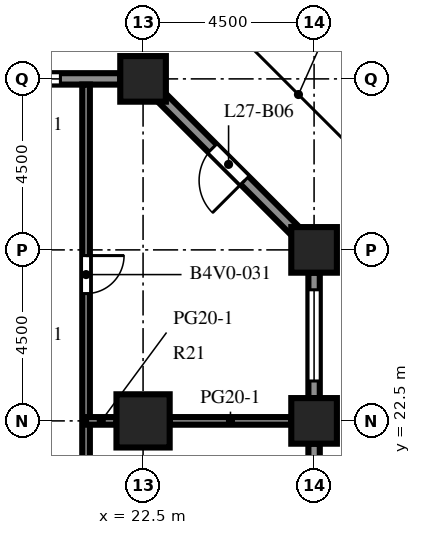
"""IFC4 building model, lengths in metres.
Left out: names, types, materials, properties, quantities, classifications, styles, units other than length and angle.
Written with IfcOpenShell. Run it as: python <this file> out.ifc"""

import sys

from ifc_helpers import new_model, si_unit, direction, frame, frame_2d, origin, origin_2d, place, context, subcontext, project, spatial, rectangle, extrude, element, fill, save


model = new_model("IFC4")
c1 = context("Model", 3, precision=1e-05, world=origin(), true_north=direction((0.0, 1.0)))
c2 = subcontext(c1, "Body", "Model", "MODEL_VIEW")
j1 = project(units=[si_unit("LENGTHUNIT", "METRE"), si_unit("PLANEANGLEUNIT", "RADIAN")], contexts=[c1])
p1 = place(None, origin())
s1 = spatial("IfcSite", under=j1, at=p1, CompositionType="ELEMENT")
p2 = place(p1, origin())
s2 = spatial("IfcBuilding", under=s1, at=p2, CompositionType="ELEMENT")
p3 = place(p2, frame((0.0, 0.0, 120.8)))
s3 = spatial("IfcBuildingStorey", under=s2, at=p3, CompositionType="ELEMENT", Elevation=120.8)
for number, where, z_axis, x_axis in (
    (1, (22.5, 31.5, 0.0), (0.0, 0.0, 1.0), (1.0, 0.0, 0.0)),
    (2, (27.0, 22.5, 0.0), (0.0, 0.0, 1.0), (1.0, 0.0, 0.0)),
    (3, (27.0, 27.0, 0.0), (0.0, 0.0, 1.0), (1.0, 0.0, 0.0)),
):
    element("IfcColumn", number, at=place(p3, frame(where, z_axis=z_axis, x_axis=x_axis)), inside=s3, PredefinedType="COLUMN", context=c2, shape_type="SweptSolid", body=[
        extrude(rectangle(XDim=1.2, YDim=1.2, at=origin_2d()), origin(), (0.0, 0.0, 1.0), 4.1),
    ])
p4 = place(p3, frame((22.5, 22.5, 0.0), z_axis=(0.0, 0.0, 1.0), x_axis=(1.0, 0.0, 0.0)))
e4 = element("IfcColumn", 4, at=p4, inside=s3, PredefinedType="COLUMN", context=c2, shape_type="SweptSolid", body=[
    extrude(rectangle(XDim=1.4, YDim=1.4, at=origin_2d()), origin(), (0.0, 0.0, 1.0), 4.1),
])
p5 = place(p3, frame((27.0, 21.9, 0.0), z_axis=(0.0, 0.0, 1.0), x_axis=(0.0, -1.0, 0.0)))
e5 = element("IfcWall", 5, at=p5, inside=s3, PredefinedType="SOLIDWALL", context=c2, shape_type="SweptSolid", body=[
    extrude(rectangle(XDim=3.3, YDim=0.3, at=frame_2d((1.65, 0.0))), origin(), (0.0, 0.0, 1.0), 2.75),
])
p6 = place(p5, frame((1.15, 0.0, 0.0)))
e6 = element("IfcOpeningElement", 6, at=p6, cuts=e5, PredefinedType="OPENING", context=c2, shape_type="SweptSolid", body=[
    extrude(rectangle(XDim=1.0, YDim=2.2, at=frame_2d((0.5, 1.1))), frame((0.0, 0.16, 0.0), z_axis=(0.0, -1.0, 0.0), x_axis=(1.0, 0.0, 0.0)), (0.0, 0.0, 1.0), 0.32),
])
p7 = place(p3, frame((27.0, 26.4, 0.0), z_axis=(0.0, 0.0, 1.0), x_axis=(0.0, -1.0, 0.0)))
e7 = element("IfcWall", 7, at=p7, inside=s3, PredefinedType="SOLIDWALL", context=c2, shape_type="SweptSolid", body=[
    extrude(rectangle(XDim=3.3, YDim=0.3, at=frame_2d((1.65, 0.0))), origin(), (0.0, 0.0, 1.0), 2.75),
])
p8 = place(p7, frame((0.45, 0.0, 0.8)))
e8 = element("IfcOpeningElement", 8, at=p8, cuts=e7, PredefinedType="OPENING", context=c2, shape_type="SweptSolid", body=[
    extrude(rectangle(XDim=2.4, YDim=1.7, at=frame_2d((1.2, 0.85))), frame((0.0, 0.16, 0.0), z_axis=(0.0, -1.0, 0.0), x_axis=(1.0, 0.0, 0.0)), (0.0, 0.0, 1.0), 0.32),
])
p9 = place(p3, frame((22.994, 31.006, 0.0), z_axis=(0.0, 0.0, 1.0), x_axis=(0.707106781187, -0.707106781187, 0.0)))
e9 = element("IfcWall", 9, at=p9, inside=s3, PredefinedType="SOLIDWALL", context=c2, shape_type="SweptSolid", body=[
    extrude(rectangle(XDim=4.967, YDim=0.3, at=frame_2d((2.483, 0.0))), origin(), (0.0, 0.0, 1.0), 2.75),
])
p10 = place(p9, frame((1.884, 0.0, 0.0)))
e10 = element("IfcOpeningElement", 10, at=p10, cuts=e9, PredefinedType="OPENING", context=c2, shape_type="SweptSolid", body=[
    extrude(rectangle(XDim=1.2, YDim=2.2, at=frame_2d((0.6, 1.1))), frame((0.0, 0.16, 0.0), z_axis=(0.0, -1.0, 0.0), x_axis=(1.0, 0.0, 0.0)), (0.0, 0.0, 1.0), 0.32),
])
p11 = place(p3, frame((18.6, 31.5, 0.0), z_axis=(0.0, 0.0, 1.0), x_axis=(1.0, 0.0, 0.0)))
e11 = element("IfcWall", 11, at=p11, inside=s3, PredefinedType="SOLIDWALL", context=c2, shape_type="SweptSolid", body=[
    extrude(rectangle(XDim=3.3, YDim=0.3, at=frame_2d((1.65, 0.0))), origin(), (0.0, 0.0, 1.0), 2.75),
])
p12 = place(p11, frame((0.525, 0.0, 0.8)))
e12 = element("IfcOpeningElement", 12, at=p12, cuts=e11, PredefinedType="OPENING", context=c2, shape_type="SweptSolid", body=[
    extrude(rectangle(XDim=1.2, YDim=1.7, at=frame_2d((0.6, 0.85))), frame((0.0, 0.16, 0.0), z_axis=(0.0, -1.0, 0.0), x_axis=(1.0, 0.0, 0.0)), (0.0, 0.0, 1.0), 0.32),
])
p13 = place(p3, frame((21.0, 31.35, 0.0), z_axis=(0.0, 0.0, 1.0), x_axis=(0.0, -1.0, 0.0)))
e13 = element("IfcWall", 13, at=p13, inside=s3, PredefinedType="PARTITIONING", context=c2, shape_type="SweptSolid", body=[
    extrude(rectangle(XDim=53.7, YDim=0.2, at=frame_2d((26.85, 0.0))), origin(), (0.0, 0.0, 1.0), 3.65),
])
p14 = place(p13, frame((47.75, 0.0, 0.0)))
e14 = element("IfcOpeningElement", 14, at=p14, cuts=e13, PredefinedType="OPENING", context=c2, shape_type="SweptSolid", body=[
    extrude(rectangle(XDim=1.0, YDim=2.1, at=frame_2d((0.5, 1.05))), frame((0.0, 0.11, 0.0), z_axis=(0.0, -1.0, 0.0), x_axis=(1.0, 0.0, 0.0)), (0.0, 0.0, 1.0), 0.22),
])
p15 = place(p13, frame((38.5, 0.0, 0.0)))
e15 = element("IfcOpeningElement", 15, at=p15, cuts=e13, PredefinedType="OPENING", context=c2, shape_type="SweptSolid", body=[
    extrude(rectangle(XDim=1.0, YDim=2.1, at=frame_2d((0.5, 1.05))), frame((0.0, 0.11, 0.0), z_axis=(0.0, -1.0, 0.0), x_axis=(1.0, 0.0, 0.0)), (0.0, 0.0, 1.0), 0.22),
])
p16 = place(p13, frame((33.5, 0.0, 0.0)))
e16 = element("IfcOpeningElement", 16, at=p16, cuts=e13, PredefinedType="OPENING", context=c2, shape_type="SweptSolid", body=[
    extrude(rectangle(XDim=1.0, YDim=2.1, at=frame_2d((0.5, 1.05))), frame((0.0, 0.11, 0.0), z_axis=(0.0, -1.0, 0.0), x_axis=(1.0, 0.0, 0.0)), (0.0, 0.0, 1.0), 0.22),
])
p17 = place(p13, frame((25.75, 0.0, 0.0)))
e17 = element("IfcOpeningElement", 17, at=p17, cuts=e13, PredefinedType="OPENING", context=c2, shape_type="SweptSolid", body=[
    extrude(rectangle(XDim=1.0, YDim=2.1, at=frame_2d((0.5, 1.05))), frame((0.0, 0.11, 0.0), z_axis=(0.0, -1.0, 0.0), x_axis=(1.0, 0.0, 0.0)), (0.0, 0.0, 1.0), 0.22),
])
p18 = place(p13, frame((14.25, 0.0, 0.0)))
e18 = element("IfcOpeningElement", 18, at=p18, cuts=e13, PredefinedType="OPENING", context=c2, shape_type="SweptSolid", body=[
    extrude(rectangle(XDim=1.0, YDim=2.1, at=frame_2d((0.5, 1.05))), frame((0.0, 0.11, 0.0), z_axis=(0.0, -1.0, 0.0), x_axis=(1.0, 0.0, 0.0)), (0.0, 0.0, 1.0), 0.22),
])
p19 = place(p13, frame((4.5, 0.0, 0.0)))
e19 = element("IfcOpeningElement", 19, at=p19, cuts=e13, PredefinedType="OPENING", context=c2, shape_type="SweptSolid", body=[
    extrude(rectangle(XDim=1.0, YDim=2.1, at=frame_2d((0.5, 1.05))), frame((0.0, 0.11, 0.0), z_axis=(0.0, -1.0, 0.0), x_axis=(1.0, 0.0, 0.0)), (0.0, 0.0, 1.0), 0.22),
])
p20 = place(p3, frame((21.0, 22.5, 0.0), z_axis=(0.0, 0.0, 1.0), x_axis=(1.0, 0.0, 0.0)))
e20 = element("IfcWall", 20, at=p20, inside=s3, PredefinedType="PARTITIONING", context=c2, shape_type="SweptSolid", body=[
    extrude(rectangle(XDim=0.8, YDim=0.2, at=frame_2d((0.4, 0.0))), origin(), (0.0, 0.0, 1.0), 3.65),
])
p21 = place(p3, frame((23.2, 22.5, 0.0), z_axis=(0.0, 0.0, 1.0), x_axis=(1.0, 0.0, 0.0)))
e21 = element("IfcWall", 21, at=p21, inside=s3, PredefinedType="PARTITIONING", context=c2, shape_type="SweptSolid", body=[
    extrude(rectangle(XDim=3.2, YDim=0.2, at=frame_2d((1.6, 0.0))), origin(), (0.0, 0.0, 1.0), 3.65),
])
p22 = place(p8, origin())
e22 = element("IfcWindow", 22, at=p22, inside=s3, PartitioningType="SINGLE_PANEL", PredefinedType="WINDOW", context=c2, shape_type="SweptSolid", body=[
    extrude(rectangle(XDim=2.4, YDim=1.7, at=frame_2d((1.2, 0.85))), frame((0.0, 0.03, 0.0), z_axis=(0.0, -1.0, 0.0), x_axis=(1.0, 0.0, 0.0)), (0.0, 0.0, 1.0), 0.06),
])
fill(e8, e22)
p23 = place(p10, origin())
e23 = element("IfcDoor", 23, at=p23, inside=s3, OperationType="SINGLE_SWING_RIGHT", PredefinedType="DOOR", context=c2, shape_type="SweptSolid", body=[
    extrude(rectangle(XDim=1.2, YDim=2.2, at=frame_2d((0.6, 1.1))), frame((0.0, 0.025, 0.0), z_axis=(0.0, -1.0, 0.0), x_axis=(1.0, 0.0, 0.0)), (0.0, 0.0, 1.0), 0.05),
])
fill(e10, e23)
p24 = place(p12, origin())
e24 = element("IfcWindow", 24, at=p24, inside=s3, PartitioningType="SINGLE_PANEL", PredefinedType="WINDOW", context=c2, shape_type="SweptSolid", body=[
    extrude(rectangle(XDim=1.2, YDim=1.7, at=frame_2d((0.6, 0.85))), frame((0.0, 0.03, 0.0), z_axis=(0.0, -1.0, 0.0), x_axis=(1.0, 0.0, 0.0)), (0.0, 0.0, 1.0), 0.06),
])
fill(e12, e24)
p25 = place(p19, origin())
e25 = element("IfcDoor", 25, at=p25, inside=s3, OperationType="SINGLE_SWING_LEFT", PredefinedType="DOOR", context=c2, shape_type="SweptSolid", body=[
    extrude(rectangle(XDim=1.0, YDim=2.1, at=frame_2d((0.5, 1.05))), frame((0.0, 0.025, 0.0), z_axis=(0.0, -1.0, 0.0), x_axis=(1.0, 0.0, 0.0)), (0.0, 0.0, 1.0), 0.05),
])
fill(e19, e25)
save(model, sys.argv[1])
